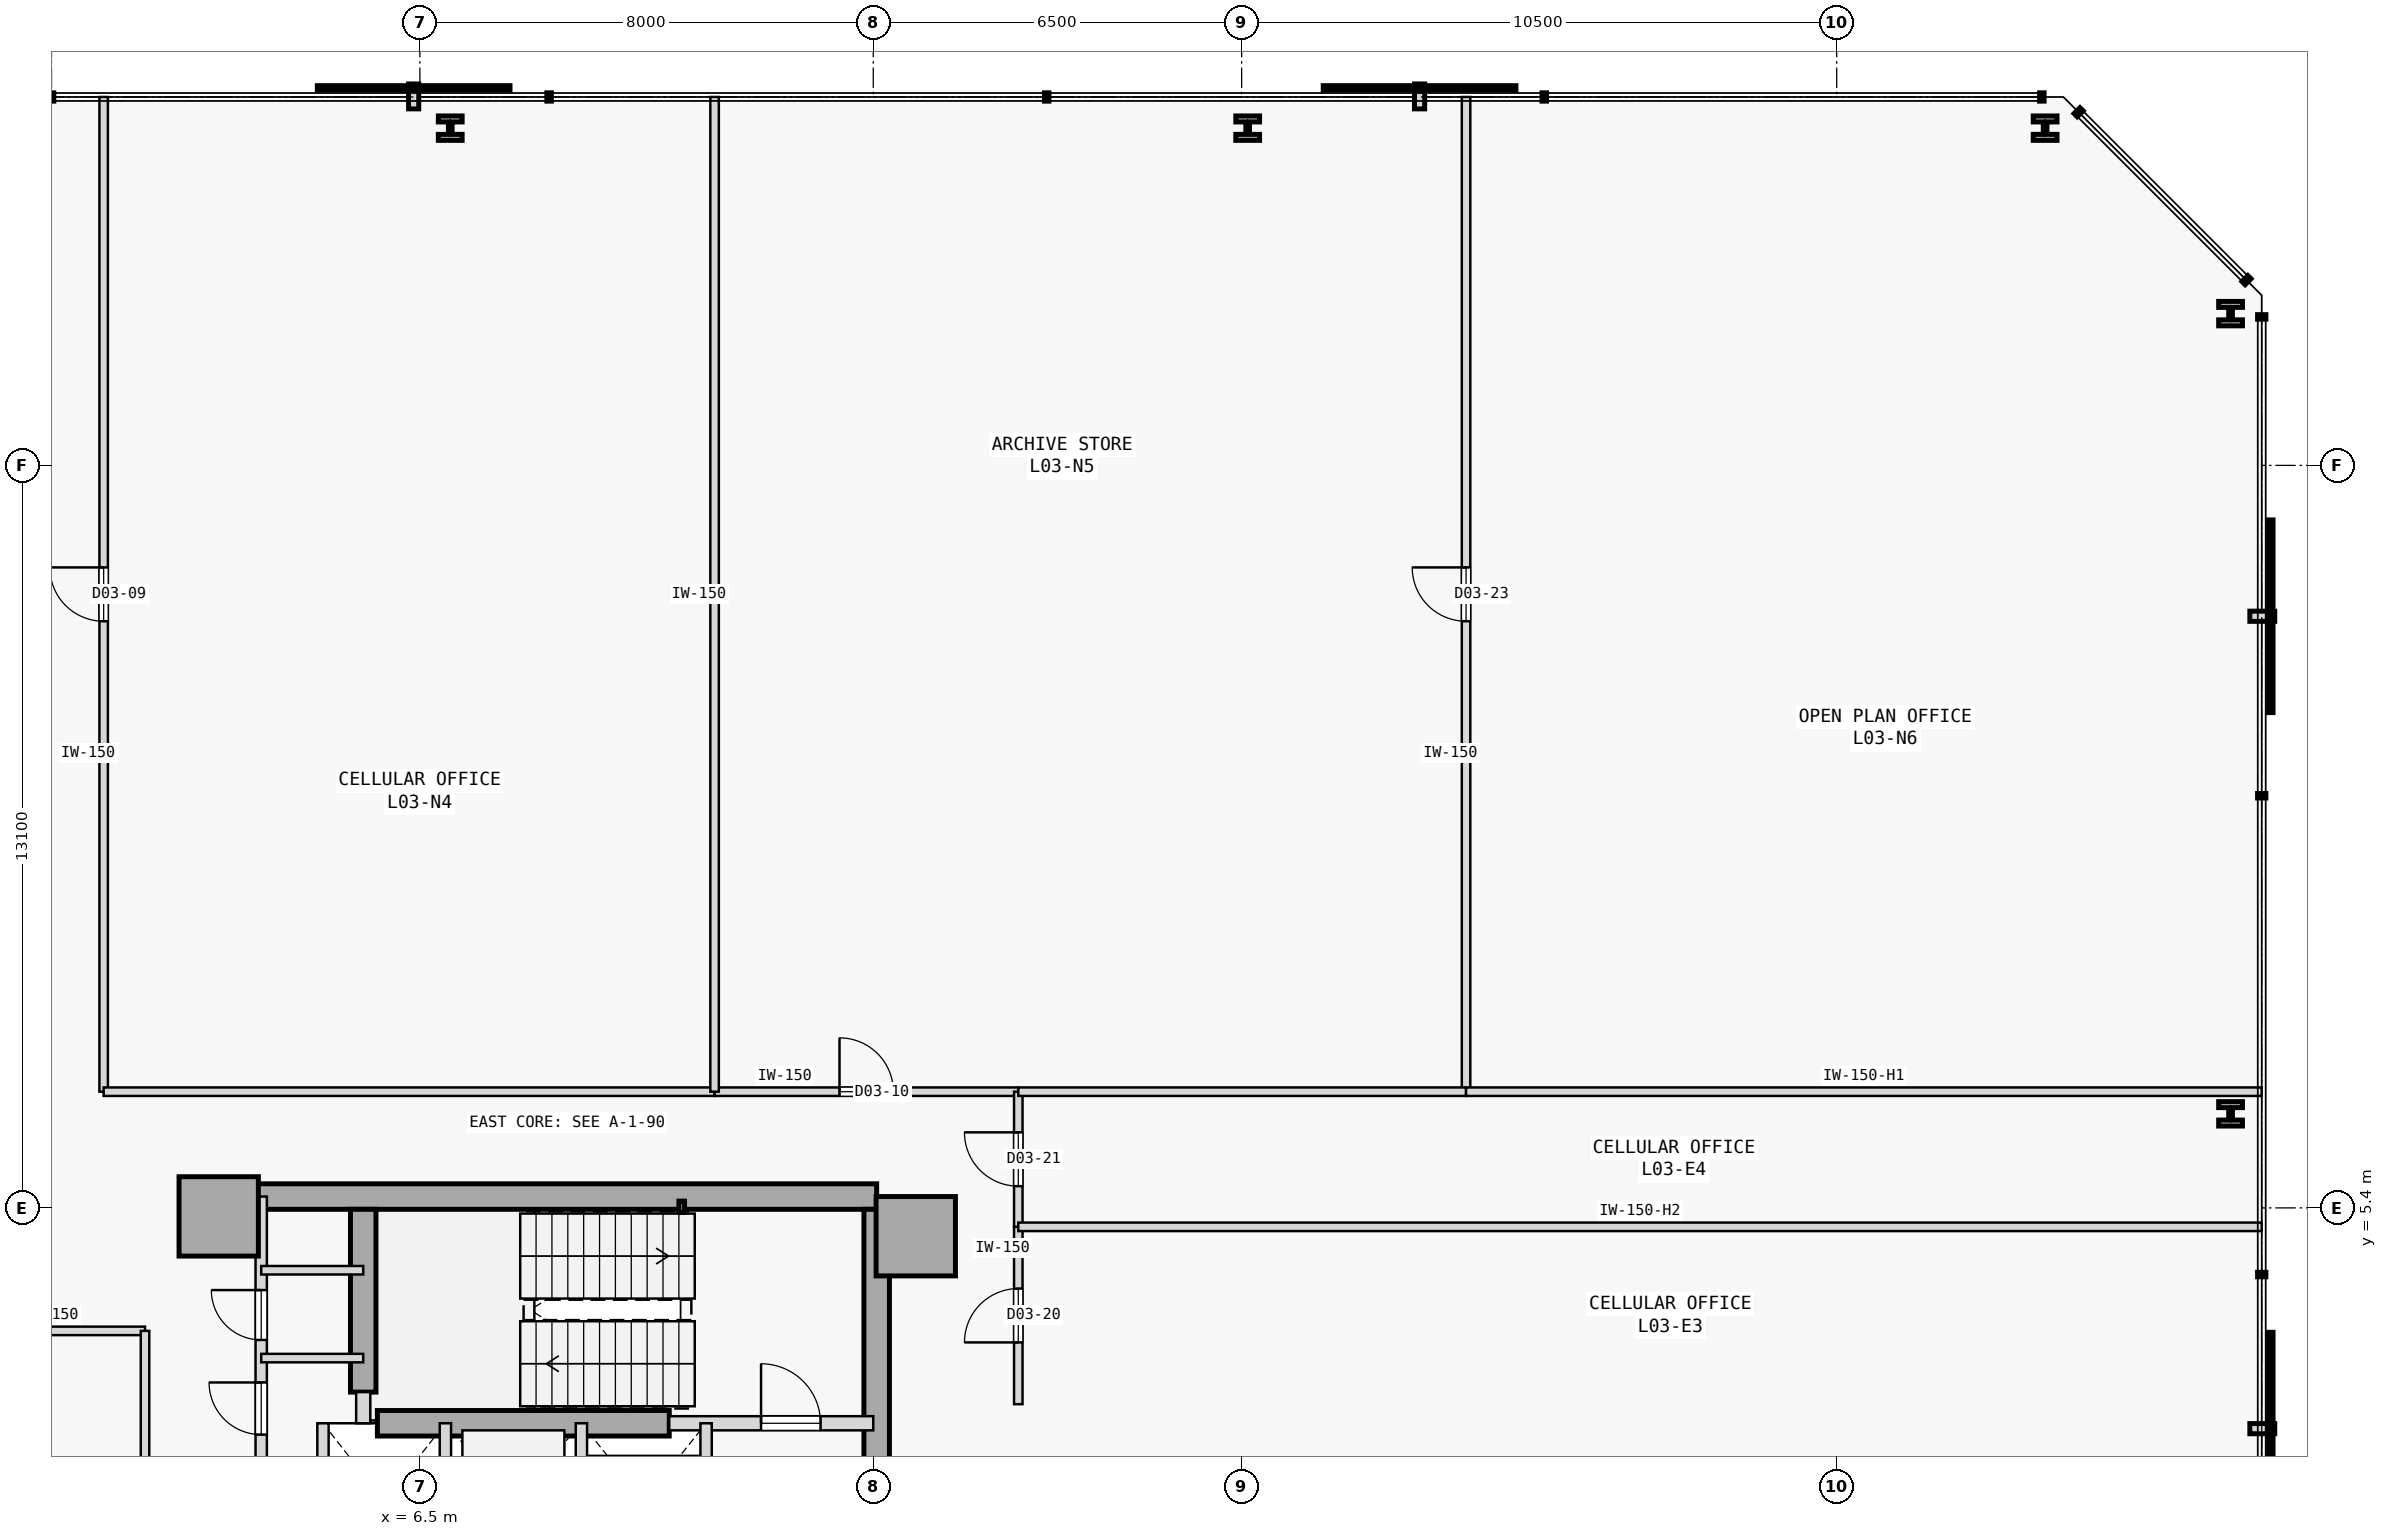
"""IFC4 building model, lengths in metres.
Left out: names, types, materials, properties, quantities, classifications, styles, units other than length and angle.
Written with IfcOpenShell. Run it as: python <this file> out.ifc"""

import sys

from ifc_helpers import new_model, si_unit, direction, frame, frame_2d, origin, origin_2d, place, context, subcontext, project, spatial, rectangle, hollow_rectangle, i_section, extrude, element, fill, save


model = new_model("IFC4")
c1 = context("Model", 3, precision=1e-05, world=origin(), true_north=direction((0.0, 1.0)))
c2 = subcontext(c1, "Body", "Model", "MODEL_VIEW")
j1 = project(units=[si_unit("LENGTHUNIT", "METRE"), si_unit("PLANEANGLEUNIT", "RADIAN")], contexts=[c1])
p1 = place(None, origin())
s1 = spatial("IfcSite", under=j1, at=p1, CompositionType="ELEMENT")
p2 = place(p1, origin())
s2 = spatial("IfcBuilding", under=s1, at=p2, CompositionType="ELEMENT")
p3 = place(p2, frame((0.0, 0.0, 18.0)))
s3 = spatial("IfcBuildingStorey", under=s2, at=p3, CompositionType="ELEMENT", Elevation=18.0)
for number, where, z_axis, x_axis in (
    (1, (15.25, 4.9, 0.0), (0.0, 0.0, 1.0), (1.0, 0.0, 0.0)),
    (2, (2.95, 5.25, 0.0), (0.0, 0.0, 1.0), (1.0, 0.0, 0.0)),
):
    element("IfcColumn", number, at=place(p3, frame(where, z_axis=z_axis, x_axis=x_axis)), inside=s3, PredefinedType="COLUMN", context=c2, shape_type="SweptSolid", body=[
        extrude(rectangle(XDim=1.4, YDim=1.4, at=origin_2d()), origin(), (0.0, 0.0, 1.0), 3.8),
    ])
p4 = place(p3, frame((3.15, 5.6, 0.0), z_axis=(0.0, 0.0, 1.0), x_axis=(1.0, 0.0, 0.0)))
e3 = element("IfcWall", 3, at=p4, inside=s3, PredefinedType="SHEAR", context=c2, shape_type="SweptSolid", body=[
    extrude(rectangle(XDim=11.41, YDim=0.45, at=frame_2d((5.705, 0.0))), origin(), (0.0, 0.0, 1.0), 3.575),
])
p5 = place(p3, frame((14.56, -5.375, 0.0), z_axis=(0.0, 0.0, 1.0), x_axis=(0.0, 1.0, 0.0)))
e4 = element("IfcWall", 4, at=p5, inside=s3, PredefinedType="SHEAR", context=c2, shape_type="SweptSolid", body=[
    extrude(rectangle(XDim=10.75, YDim=0.45, at=frame_2d((5.375, 0.0))), origin(), (0.0, 0.0, 1.0), 3.575),
])
p6 = place(p3, frame((5.5, 2.15, 0.0), z_axis=(0.0, 0.0, 1.0), x_axis=(0.0, 1.0, 0.0)))
e5 = element("IfcWall", 5, at=p6, inside=s3, PredefinedType="SHEAR", context=c2, shape_type="SweptSolid", body=[
    extrude(rectangle(XDim=3.225, YDim=0.45, at=frame_2d((1.613, 0.0))), origin(), (0.0, 0.0, 1.0), 3.575),
])
p7 = place(p3, frame((5.75, 1.6, 0.0), z_axis=(0.0, 0.0, 1.0), x_axis=(1.0, 0.0, 0.0)))
e6 = element("IfcWall", 6, at=p7, inside=s3, PredefinedType="SHEAR", context=c2, shape_type="SweptSolid", body=[
    extrude(rectangle(XDim=5.15, YDim=0.45, at=frame_2d((2.575, 0.0))), origin(), (0.0, 0.0, 1.0), 3.575),
])
p8 = place(p3, frame((11.12, 5.42, 0.0), z_axis=(0.0, 0.0, 1.0), x_axis=(1.0, 0.0, 0.0)))
e7 = element("IfcColumn", 7, at=p8, inside=s3, PredefinedType="COLUMN", context=c2, shape_type="SweptSolid", body=[
    extrude(hollow_rectangle(XDim=0.1, YDim=0.2, WallThickness=0.008, at=origin_2d()), origin(), (0.0, 0.0, 1.0), 3.8),
])
for number, where, z_axis, x_axis in (
    (8, (38.45, 7.059, 0.0), (0.0, 0.0, 1.0), (1.0, 0.0, 0.0)),
    (9, (38.45, 21.178, 0.0), (0.0, 0.0, 1.0), (1.0, 0.0, 0.0)),
    (10, (35.178, 24.45, 0.0), (0.0, 0.0, 1.0), (1.0, 0.0, 0.0)),
    (11, (21.107, 24.45, 0.0), (0.0, 0.0, 1.0), (1.0, 0.0, 0.0)),
    (12, (7.036, 24.45, 0.0), (0.0, 0.0, 1.0), (1.0, 0.0, 0.0)),
):
    element("IfcColumn", number, at=place(p3, frame(where, z_axis=z_axis, x_axis=x_axis)), inside=s3, PredefinedType="COLUMN", context=c2, shape_type="SweptSolid", body=[
        extrude(i_section(OverallWidth=0.42, OverallDepth=0.431, WebThickness=0.065, FlangeThickness=0.106, FilletRadius=0.015, at=origin_2d()), origin(), (0.0, 0.0, 1.0), 3.8),
    ])
p9 = place(p3, frame((10.9, 1.6, 0.0), z_axis=(0.0, 0.0, 1.0), x_axis=(1.0, 0.0, 0.0)))
e13 = element("IfcWall", 13, at=p9, inside=s3, PredefinedType="STANDARD", context=c2, shape_type="SweptSolid", body=[
    extrude(rectangle(XDim=3.6, YDim=0.25, at=frame_2d((1.8, 0.0))), origin(), (0.0, 0.0, 1.0), 3.575),
])
p10 = place(p9, frame((1.62, 0.0, 0.0)))
e14 = element("IfcOpeningElement", 14, at=p10, cuts=e13, PredefinedType="OPENING", context=c2, shape_type="SweptSolid", body=[
    extrude(rectangle(XDim=1.05, YDim=2.15, at=frame_2d((0.525, 1.075))), frame((0.0, 0.135, 0.0), z_axis=(0.0, -1.0, 0.0), x_axis=(1.0, 0.0, 0.0)), (0.0, 0.0, 1.0), 0.27),
])
p11 = place(p3, frame((5.5, 1.6, 0.0), z_axis=(0.0, 0.0, 1.0), x_axis=(0.0, 1.0, 0.0)))
e15 = element("IfcWall", 15, at=p11, inside=s3, PredefinedType="STANDARD", context=c2, shape_type="SweptSolid", body=[
    extrude(rectangle(XDim=0.55, YDim=0.25, at=frame_2d((0.275, 0.0))), origin(), (0.0, 0.0, 1.0), 3.575),
])
p12 = place(p3, frame((3.7, -1.15, 0.0), z_axis=(0.0, 0.0, 1.0), x_axis=(0.0, 1.0, 0.0)))
e16 = element("IfcWall", 16, at=p12, inside=s3, PredefinedType="STANDARD", context=c2, shape_type="SweptSolid", body=[
    extrude(rectangle(XDim=6.75, YDim=0.2, at=frame_2d((3.375, 0.0))), origin(), (0.0, 0.0, 1.0), 3.575),
])
p13 = place(p12, frame((0.35, 0.0, 0.0)))
e17 = element("IfcOpeningElement", 17, at=p13, cuts=e16, PredefinedType="OPENING", context=c2, shape_type="SweptSolid", body=[
    extrude(rectangle(XDim=0.88, YDim=2.15, at=frame_2d((0.44, 1.075))), frame((0.0, 0.11, 0.0), z_axis=(0.0, -1.0, 0.0), x_axis=(1.0, 0.0, 0.0)), (0.0, 0.0, 1.0), 0.22),
])
p14 = place(p12, frame((2.55, 0.0, 0.0)))
e18 = element("IfcOpeningElement", 18, at=p14, cuts=e16, PredefinedType="OPENING", context=c2, shape_type="SweptSolid", body=[
    extrude(rectangle(XDim=0.92, YDim=2.15, at=frame_2d((0.46, 1.075))), frame((0.0, 0.11, 0.0), z_axis=(0.0, -1.0, 0.0), x_axis=(1.0, 0.0, 0.0)), (0.0, 0.0, 1.0), 0.22),
])
p15 = place(p12, frame((4.22, 0.0, 0.0)))
e19 = element("IfcOpeningElement", 19, at=p15, cuts=e16, PredefinedType="OPENING", context=c2, shape_type="SweptSolid", body=[
    extrude(rectangle(XDim=0.88, YDim=2.15, at=frame_2d((0.44, 1.075))), frame((0.0, 0.11, 0.0), z_axis=(0.0, -1.0, 0.0), x_axis=(1.0, 0.0, 0.0)), (0.0, 0.0, 1.0), 0.22),
])
p16 = place(p3, frame((11.55, -1.15, 0.0), z_axis=(0.0, 0.0, 1.0), x_axis=(0.0, 1.0, 0.0)))
e20 = element("IfcWall", 20, at=p16, inside=s3, PredefinedType="STANDARD", context=c2, shape_type="SweptSolid", body=[
    extrude(rectangle(XDim=2.75, YDim=0.2, at=frame_2d((1.375, 0.0))), origin(), (0.0, 0.0, 1.0), 3.575),
])
p17 = place(p16, frame((0.825, 0.0, 0.0)))
e21 = element("IfcOpeningElement", 21, at=p17, cuts=e20, PredefinedType="OPENING", context=c2, shape_type="SweptSolid", body=[
    extrude(rectangle(XDim=1.1, YDim=2.15, at=frame_2d((0.55, 1.075))), frame((0.0, 0.11, 0.0), z_axis=(0.0, -1.0, 0.0), x_axis=(1.0, 0.0, 0.0)), (0.0, 0.0, 1.0), 0.22),
])
for number, where, z_axis, x_axis in (
    (22, (9.35, -1.15, 0.0), (0.0, 0.0, 1.0), (0.0, 1.0, 0.0)),
    (23, (6.95, -1.15, 0.0), (0.0, 0.0, 1.0), (0.0, 1.0, 0.0)),
    (24, (4.79, -1.15, 0.0), (0.0, 0.0, 1.0), (0.0, 1.0, 0.0)),
):
    element("IfcWall", number, at=place(p3, frame(where, z_axis=z_axis, x_axis=x_axis)), inside=s3, PredefinedType="STANDARD", context=c2, shape_type="SweptSolid", body=[
        extrude(rectangle(XDim=2.75, YDim=0.2, at=frame_2d((1.375, 0.0))), origin(), (0.0, 0.0, 1.0), 3.575),
    ])
for number, where, z_axis, x_axis in (
    (25, (3.7, 4.3, 0.0), (0.0, 0.0, 1.0), (1.0, 0.0, 0.0)),
    (26, (3.7, 2.75, 0.0), (0.0, 0.0, 1.0), (1.0, 0.0, 0.0)),
):
    element("IfcWall", number, at=place(p3, frame(where, z_axis=z_axis, x_axis=x_axis)), inside=s3, PredefinedType="PARTITIONING", context=c2, shape_type="SweptSolid", body=[
        extrude(rectangle(XDim=1.8, YDim=0.15, at=frame_2d((0.9, 0.0))), origin(), (0.0, 0.0, 1.0), 3.575),
    ])
p18 = place(p3, frame((-1.65, 3.23, 0.0), z_axis=(0.0, 0.0, 1.0), x_axis=(1.0, 0.0, 0.0)))
e27 = element("IfcWall", 27, at=p18, inside=s3, PredefinedType="PARTITIONING", context=c2, shape_type="SweptSolid", body=[
    extrude(rectangle(XDim=3.3, YDim=0.15, at=frame_2d((1.65, 0.0))), origin(), (0.0, 0.0, 1.0), 3.575),
])
p19 = place(p3, frame((1.65, -3.23, 0.0), z_axis=(0.0, 0.0, 1.0), x_axis=(0.0, 1.0, 0.0)))
e28 = element("IfcWall", 28, at=p19, inside=s3, PredefinedType="PARTITIONING", context=c2, shape_type="SweptSolid", body=[
    extrude(rectangle(XDim=6.46, YDim=0.15, at=frame_2d((3.23, 0.0))), origin(), (0.0, 0.0, 1.0), 3.575),
])
p20 = place(p3, frame((0.92, 7.45, 0.0), z_axis=(0.0, 0.0, 1.0), x_axis=(0.0, 1.0, 0.0)))
e29 = element("IfcWall", 29, at=p20, inside=s3, PredefinedType="PARTITIONING", context=c2, shape_type="SweptSolid", body=[
    extrude(rectangle(XDim=17.55, YDim=0.15, at=frame_2d((8.775, 0.0))), origin(), (0.0, 0.0, 1.0), 3.575),
])
p21 = place(p20, frame((8.3, 0.0, 0.0)))
e30 = element("IfcOpeningElement", 30, at=p21, cuts=e29, PredefinedType="OPENING", context=c2, shape_type="SweptSolid", body=[
    extrude(rectangle(XDim=0.95, YDim=2.15, at=frame_2d((0.475, 1.075))), frame((0.0, 0.085, 0.0), z_axis=(0.0, -1.0, 0.0), x_axis=(1.0, 0.0, 0.0)), (0.0, 0.0, 1.0), 0.17),
])
p22 = place(p3, frame((0.92, 7.45, 0.0), z_axis=(0.0, 0.0, 1.0), x_axis=(1.0, 0.0, 0.0)))
e31 = element("IfcWall", 31, at=p22, inside=s3, PredefinedType="PARTITIONING", context=c2, shape_type="SweptSolid", body=[
    extrude(rectangle(XDim=10.78, YDim=0.15, at=frame_2d((5.39, 0.0))), origin(), (0.0, 0.0, 1.0), 3.575),
])
p23 = place(p3, frame((11.7, 7.45, 0.0), z_axis=(0.0, 0.0, 1.0), x_axis=(1.0, 0.0, 0.0)))
e32 = element("IfcWall", 32, at=p23, inside=s3, PredefinedType="PARTITIONING", context=c2, shape_type="SweptSolid", body=[
    extrude(rectangle(XDim=5.359, YDim=0.15, at=frame_2d((2.68, 0.0))), origin(), (0.0, 0.0, 1.0), 3.575),
])
p24 = place(p23, frame((2.205, 0.0, 0.0)))
e33 = element("IfcOpeningElement", 33, at=p24, cuts=e32, PredefinedType="OPENING", context=c2, shape_type="SweptSolid", body=[
    extrude(rectangle(XDim=0.95, YDim=2.15, at=frame_2d((0.475, 1.075))), frame((0.0, 0.085, 0.0), z_axis=(0.0, -1.0, 0.0), x_axis=(1.0, 0.0, 0.0)), (0.0, 0.0, 1.0), 0.17),
])
p25 = place(p3, frame((17.059, 1.937, 0.0), z_axis=(0.0, 0.0, 1.0), x_axis=(0.0, 1.0, 0.0)))
e34 = element("IfcWall", 34, at=p25, inside=s3, PredefinedType="PARTITIONING", context=c2, shape_type="SweptSolid", body=[
    extrude(rectangle(XDim=3.129, YDim=0.15, at=frame_2d((1.564, 0.0))), origin(), (0.0, 0.0, 1.0), 3.575),
])
p26 = place(p25, frame((1.09, 0.0, 0.0)))
e35 = element("IfcOpeningElement", 35, at=p26, cuts=e34, PredefinedType="OPENING", context=c2, shape_type="SweptSolid", body=[
    extrude(rectangle(XDim=0.95, YDim=2.15, at=frame_2d((0.475, 1.075))), frame((0.0, 0.085, 0.0), z_axis=(0.0, -1.0, 0.0), x_axis=(1.0, 0.0, 0.0)), (0.0, 0.0, 1.0), 0.17),
])
p27 = place(p3, frame((17.059, 5.066, 0.0), z_axis=(0.0, 0.0, 1.0), x_axis=(0.0, 1.0, 0.0)))
e36 = element("IfcWall", 36, at=p27, inside=s3, PredefinedType="PARTITIONING", context=c2, shape_type="SweptSolid", body=[
    extrude(rectangle(XDim=2.384, YDim=0.15, at=frame_2d((1.192, 0.0))), origin(), (0.0, 0.0, 1.0), 3.575),
])
p28 = place(p27, frame((0.717, 0.0, 0.0)))
e37 = element("IfcOpeningElement", 37, at=p28, cuts=e36, PredefinedType="OPENING", context=c2, shape_type="SweptSolid", body=[
    extrude(rectangle(XDim=0.95, YDim=2.15, at=frame_2d((0.475, 1.075))), frame((0.0, 0.085, 0.0), z_axis=(0.0, -1.0, 0.0), x_axis=(1.0, 0.0, 0.0)), (0.0, 0.0, 1.0), 0.17),
])
p29 = place(p3, frame((11.7, 7.45, 0.0), z_axis=(0.0, 0.0, 1.0), x_axis=(0.0, 1.0, 0.0)))
e38 = element("IfcWall", 38, at=p29, inside=s3, PredefinedType="PARTITIONING", context=c2, shape_type="SweptSolid", body=[
    extrude(rectangle(XDim=17.55, YDim=0.15, at=frame_2d((8.775, 0.0))), origin(), (0.0, 0.0, 1.0), 3.575),
])
p30 = place(p3, frame((24.96, 7.45, 0.0), z_axis=(0.0, 0.0, 1.0), x_axis=(0.0, 1.0, 0.0)))
e39 = element("IfcWall", 39, at=p30, inside=s3, PredefinedType="PARTITIONING", context=c2, shape_type="SweptSolid", body=[
    extrude(rectangle(XDim=17.55, YDim=0.15, at=frame_2d((8.775, 0.0))), origin(), (0.0, 0.0, 1.0), 3.575),
])
p31 = place(p30, frame((8.3, 0.0, 0.0)))
e40 = element("IfcOpeningElement", 40, at=p31, cuts=e39, PredefinedType="OPENING", context=c2, shape_type="SweptSolid", body=[
    extrude(rectangle(XDim=0.95, YDim=2.15, at=frame_2d((0.475, 1.075))), frame((0.0, 0.085, 0.0), z_axis=(0.0, -1.0, 0.0), x_axis=(1.0, 0.0, 0.0)), (0.0, 0.0, 1.0), 0.17),
])
p32 = place(p3, frame((17.059, 7.45, 0.0), z_axis=(0.0, 0.0, 1.0), x_axis=(1.0, 0.0, 0.0)))
e41 = element("IfcWall", 41, at=p32, inside=s3, PredefinedType="PARTITIONING", context=c2, shape_type="SweptSolid", body=[
    extrude(rectangle(XDim=7.901, YDim=0.15, at=frame_2d((3.95, 0.0))), origin(), (0.0, 0.0, 1.0), 3.575),
])
p33 = place(p3, frame((24.96, 7.45, 0.0), z_axis=(0.0, 0.0, 1.0), x_axis=(1.0, 0.0, 0.0)))
e42 = element("IfcWall", 42, at=p33, inside=s3, PredefinedType="PARTITIONING", context=c2, shape_type="SweptSolid", body=[
    extrude(rectangle(XDim=14.04, YDim=0.15, at=frame_2d((7.02, 0.0))), origin(), (0.0, 0.0, 1.0), 3.125),
])
p34 = place(p3, frame((17.059, 5.066, 0.0), z_axis=(0.0, 0.0, 1.0), x_axis=(1.0, 0.0, 0.0)))
e43 = element("IfcWall", 43, at=p34, inside=s3, PredefinedType="PARTITIONING", context=c2, shape_type="SweptSolid", body=[
    extrude(rectangle(XDim=21.941, YDim=0.15, at=frame_2d((10.97, 0.0))), origin(), (0.0, 0.0, 1.0), 2.975),
])
p35 = place(p10, origin())
e44 = element("IfcDoor", 44, at=p35, inside=s3, OperationType="SINGLE_SWING_LEFT", PredefinedType="DOOR", context=c2, shape_type="SweptSolid", body=[
    extrude(rectangle(XDim=1.05, YDim=2.15, at=frame_2d((0.525, 1.075))), frame((0.0, 0.025, 0.0), z_axis=(0.0, -1.0, 0.0), x_axis=(1.0, 0.0, 0.0)), (0.0, 0.0, 1.0), 0.05),
])
fill(e14, e44)
p36 = place(p14, origin())
e45 = element("IfcDoor", 45, at=p36, inside=s3, OperationType="SINGLE_SWING_RIGHT", PredefinedType="DOOR", context=c2, shape_type="SweptSolid", body=[
    extrude(rectangle(XDim=0.92, YDim=2.15, at=frame_2d((0.46, 1.075))), frame((0.0, 0.025, 0.0), z_axis=(0.0, -1.0, 0.0), x_axis=(1.0, 0.0, 0.0)), (0.0, 0.0, 1.0), 0.05),
])
fill(e18, e45)
p37 = place(p15, origin())
e46 = element("IfcDoor", 46, at=p37, inside=s3, OperationType="SINGLE_SWING_RIGHT", PredefinedType="DOOR", context=c2, shape_type="SweptSolid", body=[
    extrude(rectangle(XDim=0.88, YDim=2.15, at=frame_2d((0.44, 1.075))), frame((0.0, 0.025, 0.0), z_axis=(0.0, -1.0, 0.0), x_axis=(1.0, 0.0, 0.0)), (0.0, 0.0, 1.0), 0.05),
])
fill(e19, e46)
p38 = place(p21, origin())
e47 = element("IfcDoor", 47, at=p38, inside=s3, OperationType="SINGLE_SWING_RIGHT", PredefinedType="DOOR", context=c2, shape_type="SweptSolid", body=[
    extrude(rectangle(XDim=0.95, YDim=2.15, at=frame_2d((0.475, 1.075))), frame((0.0, 0.025, 0.0), z_axis=(0.0, -1.0, 0.0), x_axis=(1.0, 0.0, 0.0)), (0.0, 0.0, 1.0), 0.05),
])
fill(e30, e47)
p39 = place(p24, origin())
e48 = element("IfcDoor", 48, at=p39, inside=s3, OperationType="SINGLE_SWING_LEFT", PredefinedType="DOOR", context=c2, shape_type="SweptSolid", body=[
    extrude(rectangle(XDim=0.95, YDim=2.15, at=frame_2d((0.475, 1.075))), frame((0.0, 0.025, 0.0), z_axis=(0.0, -1.0, 0.0), x_axis=(1.0, 0.0, 0.0)), (0.0, 0.0, 1.0), 0.05),
])
fill(e33, e48)
p40 = place(p26, origin())
e49 = element("IfcDoor", 49, at=p40, inside=s3, OperationType="SINGLE_SWING_LEFT", PredefinedType="DOOR", context=c2, shape_type="SweptSolid", body=[
    extrude(rectangle(XDim=0.95, YDim=2.15, at=frame_2d((0.475, 1.075))), frame((0.0, 0.025, 0.0), z_axis=(0.0, -1.0, 0.0), x_axis=(1.0, 0.0, 0.0)), (0.0, 0.0, 1.0), 0.05),
])
fill(e35, e49)
p41 = place(p28, origin())
e50 = element("IfcDoor", 50, at=p41, inside=s3, OperationType="SINGLE_SWING_RIGHT", PredefinedType="DOOR", context=c2, shape_type="SweptSolid", body=[
    extrude(rectangle(XDim=0.95, YDim=2.15, at=frame_2d((0.475, 1.075))), frame((0.0, 0.025, 0.0), z_axis=(0.0, -1.0, 0.0), x_axis=(1.0, 0.0, 0.0)), (0.0, 0.0, 1.0), 0.05),
])
fill(e37, e50)
p42 = place(p31, origin())
e51 = element("IfcDoor", 51, at=p42, inside=s3, OperationType="SINGLE_SWING_RIGHT", PredefinedType="DOOR", context=c2, shape_type="SweptSolid", body=[
    extrude(rectangle(XDim=0.95, YDim=2.15, at=frame_2d((0.475, 1.075))), frame((0.0, 0.025, 0.0), z_axis=(0.0, -1.0, 0.0), x_axis=(1.0, 0.0, 0.0)), (0.0, 0.0, 1.0), 0.05),
])
fill(e40, e51)
save(model, sys.argv[1])
